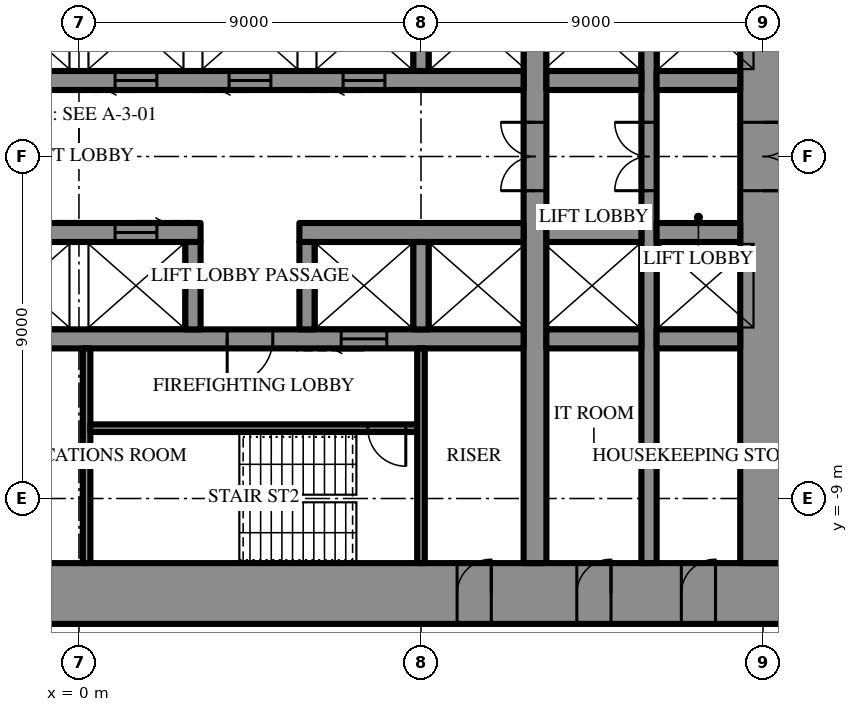
"""IFC4 building model, lengths in metres.
Left out: names, types, materials, properties, quantities, classifications, styles, units other than length and angle.
Written with IfcOpenShell. Run it as: python <this file> out.ifc"""

import sys

from ifc_helpers import new_model, si_unit, direction, frame, frame_2d, origin, place, context, subcontext, project, spatial, rectangle, extrude, element, fill, save


model = new_model("IFC4")
c1 = context("Model", 3, precision=1e-05, world=origin(), true_north=direction((0.0, 1.0)))
c2 = subcontext(c1, "Body", "Model", "MODEL_VIEW")
j1 = project(units=[si_unit("LENGTHUNIT", "METRE"), si_unit("PLANEANGLEUNIT", "RADIAN")], contexts=[c1])
p1 = place(None, origin())
s1 = spatial("IfcSite", under=j1, at=p1, CompositionType="ELEMENT")
p2 = place(p1, origin())
s2 = spatial("IfcBuilding", under=s1, at=p2, CompositionType="ELEMENT")
p3 = place(p2, frame((0.0, 0.0, 73.9)))
s3 = spatial("IfcBuildingStorey", under=s2, at=p3, CompositionType="ELEMENT", Elevation=73.9)
p4 = place(p3, frame((18.6, -11.5, 0.0), z_axis=(0.0, 0.0, 1.0), x_axis=(-1.0, 0.0, 0.0)))
e1 = element("IfcWall", 1, at=p4, inside=s3, PredefinedType="SHEAR", context=c2, shape_type="SweptSolid", body=[
    extrude(rectangle(XDim=37.2, YDim=1.6, at=frame_2d((18.6, 0.0))), origin(), (0.0, 0.0, 1.0), 4.2),
])
p5 = place(p4, frame((19.45, 0.0, 0.0)))
e2 = element("IfcOpeningElement", 2, at=p5, cuts=e1, PredefinedType="OPENING", context=c2, shape_type="SweptSolid", body=[
    extrude(rectangle(XDim=0.9, YDim=2.2, at=frame_2d((0.45, 1.1))), frame((0.0, 0.81, 0.0), z_axis=(0.0, -1.0, 0.0), x_axis=(1.0, 0.0, 0.0)), (0.0, 0.0, 1.0), 1.62),
])
p6 = place(p4, frame((22.45, 0.0, 0.0)))
e3 = element("IfcOpeningElement", 3, at=p6, cuts=e1, PredefinedType="OPENING", context=c2, shape_type="SweptSolid", body=[
    extrude(rectangle(XDim=0.9, YDim=2.2, at=frame_2d((0.45, 1.1))), frame((0.0, 0.81, 0.0), z_axis=(0.0, -1.0, 0.0), x_axis=(1.0, 0.0, 0.0)), (0.0, 0.0, 1.0), 1.62),
])
p7 = place(p4, frame((25.5, 0.0, 0.0)))
e4 = element("IfcOpeningElement", 4, at=p7, cuts=e1, PredefinedType="OPENING", context=c2, shape_type="SweptSolid", body=[
    extrude(rectangle(XDim=1.0, YDim=2.2, at=frame_2d((0.5, 1.1))), frame((0.0, 0.81, 0.0), z_axis=(0.0, -1.0, 0.0), x_axis=(1.0, 0.0, 0.0)), (0.0, 0.0, 1.0), 1.62),
])
p8 = place(p4, frame((1.85, 0.0, 0.0)))
e5 = element("IfcOpeningElement", 5, at=p8, cuts=e1, PredefinedType="OPENING", context=c2, shape_type="SweptSolid", body=[
    extrude(rectangle(XDim=0.9, YDim=2.2, at=frame_2d((0.45, 1.1))), frame((0.0, 0.81, 0.0), z_axis=(0.0, -1.0, 0.0), x_axis=(1.0, 0.0, 0.0)), (0.0, 0.0, 1.0), 1.62),
])
p9 = place(p4, frame((4.6, 0.0, 0.0)))
e6 = element("IfcOpeningElement", 6, at=p9, cuts=e1, PredefinedType="OPENING", context=c2, shape_type="SweptSolid", body=[
    extrude(rectangle(XDim=0.9, YDim=2.2, at=frame_2d((0.45, 1.1))), frame((0.0, 0.81, 0.0), z_axis=(0.0, -1.0, 0.0), x_axis=(1.0, 0.0, 0.0)), (0.0, 0.0, 1.0), 1.62),
])
p10 = place(p4, frame((7.75, 0.0, 0.0)))
e7 = element("IfcOpeningElement", 7, at=p10, cuts=e1, PredefinedType="OPENING", context=c2, shape_type="SweptSolid", body=[
    extrude(rectangle(XDim=0.9, YDim=2.2, at=frame_2d((0.45, 1.1))), frame((0.0, 0.81, 0.0), z_axis=(0.0, -1.0, 0.0), x_axis=(1.0, 0.0, 0.0)), (0.0, 0.0, 1.0), 1.62),
])
p11 = place(p4, frame((28.55, 0.0, 0.0)))
e8 = element("IfcOpeningElement", 8, at=p11, cuts=e1, PredefinedType="OPENING", context=c2, shape_type="SweptSolid", body=[
    extrude(rectangle(XDim=0.9, YDim=2.2, at=frame_2d((0.45, 1.1))), frame((0.0, 0.81, 0.0), z_axis=(0.0, -1.0, 0.0), x_axis=(1.0, 0.0, 0.0)), (0.0, 0.0, 1.0), 1.62),
])
p12 = place(p4, frame((31.7, 0.0, 0.0)))
e9 = element("IfcOpeningElement", 9, at=p12, cuts=e1, PredefinedType="OPENING", context=c2, shape_type="SweptSolid", body=[
    extrude(rectangle(XDim=0.9, YDim=2.2, at=frame_2d((0.45, 1.1))), frame((0.0, 0.81, 0.0), z_axis=(0.0, -1.0, 0.0), x_axis=(1.0, 0.0, 0.0)), (0.0, 0.0, 1.0), 1.62),
])
p13 = place(p4, frame((34.45, 0.0, 0.0)))
e10 = element("IfcOpeningElement", 10, at=p13, cuts=e1, PredefinedType="OPENING", context=c2, shape_type="SweptSolid", body=[
    extrude(rectangle(XDim=0.9, YDim=2.2, at=frame_2d((0.45, 1.1))), frame((0.0, 0.81, 0.0), z_axis=(0.0, -1.0, 0.0), x_axis=(1.0, 0.0, 0.0)), (0.0, 0.0, 1.0), 1.62),
])
p14 = place(p3, frame((18.0, -10.7, 0.0), z_axis=(0.0, 0.0, 1.0), x_axis=(0.0, 1.0, 0.0)))
e11 = element("IfcWall", 11, at=p14, inside=s3, PredefinedType="SHEAR", context=c2, shape_type="SweptSolid", body=[
    extrude(rectangle(XDim=21.4, YDim=1.2, at=frame_2d((10.7, 0.0))), origin(), (0.0, 0.0, 1.0), 4.2),
])
p15 = place(p14, frame((9.8, 0.0, 0.0)))
e12 = element("IfcOpeningElement", 12, at=p15, cuts=e11, PredefinedType="OPENING", context=c2, shape_type="SweptSolid", body=[
    extrude(rectangle(XDim=1.8, YDim=2.4, at=frame_2d((0.9, 1.2))), frame((0.0, 0.61, 0.0), z_axis=(0.0, -1.0, 0.0), x_axis=(1.0, 0.0, 0.0)), (0.0, 0.0, 1.0), 1.22),
])
p16 = place(p3, frame((12.0, -10.7, 0.0), z_axis=(0.0, 0.0, 1.0), x_axis=(0.0, 1.0, 0.0)))
e13 = element("IfcWall", 13, at=p16, inside=s3, PredefinedType="SHEAR", context=c2, shape_type="SweptSolid", body=[
    extrude(rectangle(XDim=21.4, YDim=0.6, at=frame_2d((10.7, 0.0))), origin(), (0.0, 0.0, 1.0), 4.2),
])
p17 = place(p16, frame((9.8, 0.0, 0.0)))
e14 = element("IfcOpeningElement", 14, at=p17, cuts=e13, PredefinedType="OPENING", context=c2, shape_type="SweptSolid", body=[
    extrude(rectangle(XDim=1.8, YDim=2.4, at=frame_2d((0.9, 1.2))), frame((0.0, 0.31, 0.0), z_axis=(0.0, -1.0, 0.0), x_axis=(1.0, 0.0, 0.0)), (0.0, 0.0, 1.0), 0.62),
])
p18 = place(p3, frame((15.0, -10.7, 0.0), z_axis=(0.0, 0.0, 1.0), x_axis=(0.0, 1.0, 0.0)))
e15 = element("IfcWall", 15, at=p18, inside=s3, PredefinedType="SHEAR", context=c2, shape_type="SweptSolid", body=[
    extrude(rectangle(XDim=21.4, YDim=0.4, at=frame_2d((10.7, 0.0))), origin(), (0.0, 0.0, 1.0), 4.2),
])
p19 = place(p18, frame((9.8, 0.0, 0.0)))
e16 = element("IfcOpeningElement", 16, at=p19, cuts=e15, PredefinedType="OPENING", context=c2, shape_type="SweptSolid", body=[
    extrude(rectangle(XDim=1.8, YDim=2.4, at=frame_2d((0.9, 1.2))), frame((0.0, 0.21, 0.0), z_axis=(0.0, -1.0, 0.0), x_axis=(1.0, 0.0, 0.0)), (0.0, 0.0, 1.0), 0.42),
])
p20 = place(p3, frame((-3.2, 2.0, 0.0), z_axis=(0.0, 0.0, 1.0), x_axis=(1.0, 0.0, 0.0)))
e17 = element("IfcWall", 17, at=p20, inside=s3, PredefinedType="SHEAR", context=c2, shape_type="SweptSolid", body=[
    extrude(rectangle(XDim=14.9, YDim=0.5, at=frame_2d((7.45, 0.0))), origin(), (0.0, 0.0, 1.0), 4.2),
])
p21 = place(p20, frame((1.15, 0.0, 0.0)))
e18 = element("IfcOpeningElement", 18, at=p21, cuts=e17, PredefinedType="OPENING", context=c2, shape_type="SweptSolid", body=[
    extrude(rectangle(XDim=1.1, YDim=2.2, at=frame_2d((0.55, 1.1))), frame((0.0, 0.26, 0.0), z_axis=(0.0, -1.0, 0.0), x_axis=(1.0, 0.0, 0.0)), (0.0, 0.0, 1.0), 0.52),
])
p22 = place(p20, frame((4.15, 0.0, 0.0)))
e19 = element("IfcOpeningElement", 19, at=p22, cuts=e17, PredefinedType="OPENING", context=c2, shape_type="SweptSolid", body=[
    extrude(rectangle(XDim=1.1, YDim=2.2, at=frame_2d((0.55, 1.1))), frame((0.0, 0.26, 0.0), z_axis=(0.0, -1.0, 0.0), x_axis=(1.0, 0.0, 0.0)), (0.0, 0.0, 1.0), 0.52),
])
p23 = place(p20, frame((7.15, 0.0, 0.0)))
e20 = element("IfcOpeningElement", 20, at=p23, cuts=e17, PredefinedType="OPENING", context=c2, shape_type="SweptSolid", body=[
    extrude(rectangle(XDim=1.1, YDim=2.2, at=frame_2d((0.55, 1.1))), frame((0.0, 0.26, 0.0), z_axis=(0.0, -1.0, 0.0), x_axis=(1.0, 0.0, 0.0)), (0.0, 0.0, 1.0), 0.52),
])
p24 = place(p20, frame((10.15, 0.0, 0.0)))
e21 = element("IfcOpeningElement", 21, at=p24, cuts=e17, PredefinedType="OPENING", context=c2, shape_type="SweptSolid", body=[
    extrude(rectangle(XDim=1.1, YDim=2.2, at=frame_2d((0.55, 1.1))), frame((0.0, 0.26, 0.0), z_axis=(0.0, -1.0, 0.0), x_axis=(1.0, 0.0, 0.0)), (0.0, 0.0, 1.0), 0.52),
])
p25 = place(p3, frame((12.3, 2.0, 0.0), z_axis=(0.0, 0.0, 1.0), x_axis=(1.0, 0.0, 0.0)))
e22 = element("IfcWall", 22, at=p25, inside=s3, PredefinedType="SHEAR", context=c2, shape_type="SweptSolid", body=[
    extrude(rectangle(XDim=2.5, YDim=0.5, at=frame_2d((1.25, 0.0))), origin(), (0.0, 0.0, 1.0), 4.2),
])
p26 = place(p3, frame((15.2, 2.0, 0.0), z_axis=(0.0, 0.0, 1.0), x_axis=(1.0, 0.0, 0.0)))
e23 = element("IfcWall", 23, at=p26, inside=s3, PredefinedType="SHEAR", context=c2, shape_type="SweptSolid", body=[
    extrude(rectangle(XDim=2.2, YDim=0.5, at=frame_2d((1.1, 0.0))), origin(), (0.0, 0.0, 1.0), 4.2),
])
p27 = place(p3, frame((9.0, 2.25, 0.0), z_axis=(0.0, 0.0, 1.0), x_axis=(0.0, 1.0, 0.0)))
e24 = element("IfcWall", 24, at=p27, inside=s3, PredefinedType="SHEAR", context=c2, shape_type="SweptSolid", body=[
    extrude(rectangle(XDim=2.3, YDim=0.4, at=frame_2d((1.15, 0.0))), origin(), (0.0, 0.0, 1.0), 4.2),
])
p28 = place(p3, frame((17.4, -2.0, 0.0), z_axis=(0.0, 0.0, 1.0), x_axis=(-1.0, 0.0, 0.0)))
e25 = element("IfcWall", 25, at=p28, inside=s3, PredefinedType="SHEAR", context=c2, shape_type="SweptSolid", body=[
    extrude(rectangle(XDim=2.2, YDim=0.5, at=frame_2d((1.1, 0.0))), origin(), (0.0, 0.0, 1.0), 4.2),
])
p29 = place(p3, frame((14.8, -2.0, 0.0), z_axis=(0.0, 0.0, 1.0), x_axis=(-1.0, 0.0, 0.0)))
e26 = element("IfcWall", 26, at=p29, inside=s3, PredefinedType="SHEAR", context=c2, shape_type="SweptSolid", body=[
    extrude(rectangle(XDim=2.5, YDim=0.5, at=frame_2d((1.25, 0.0))), origin(), (0.0, 0.0, 1.0), 4.2),
])
p30 = place(p3, frame((11.7, -2.0, 0.0), z_axis=(0.0, 0.0, 1.0), x_axis=(-1.0, 0.0, 0.0)))
e27 = element("IfcWall", 27, at=p30, inside=s3, PredefinedType="SHEAR", context=c2, shape_type="SweptSolid", body=[
    extrude(rectangle(XDim=5.9, YDim=0.5, at=frame_2d((2.95, 0.0))), origin(), (0.0, 0.0, 1.0), 4.2),
])
p31 = place(p3, frame((3.2, -2.0, 0.0), z_axis=(0.0, 0.0, 1.0), x_axis=(-1.0, 0.0, 0.0)))
e28 = element("IfcWall", 28, at=p31, inside=s3, PredefinedType="SHEAR", context=c2, shape_type="SweptSolid", body=[
    extrude(rectangle(XDim=14.9, YDim=0.5, at=frame_2d((7.45, 0.0))), origin(), (0.0, 0.0, 1.0), 4.2),
])
p32 = place(p31, frame((1.15, 0.0, 0.0)))
e29 = element("IfcOpeningElement", 29, at=p32, cuts=e28, PredefinedType="OPENING", context=c2, shape_type="SweptSolid", body=[
    extrude(rectangle(XDim=1.1, YDim=2.2, at=frame_2d((0.55, 1.1))), frame((0.0, 0.26, 0.0), z_axis=(0.0, -1.0, 0.0), x_axis=(1.0, 0.0, 0.0)), (0.0, 0.0, 1.0), 0.52),
])
p33 = place(p31, frame((4.15, 0.0, 0.0)))
e30 = element("IfcOpeningElement", 30, at=p33, cuts=e28, PredefinedType="OPENING", context=c2, shape_type="SweptSolid", body=[
    extrude(rectangle(XDim=1.1, YDim=2.2, at=frame_2d((0.55, 1.1))), frame((0.0, 0.26, 0.0), z_axis=(0.0, -1.0, 0.0), x_axis=(1.0, 0.0, 0.0)), (0.0, 0.0, 1.0), 0.52),
])
p34 = place(p31, frame((7.15, 0.0, 0.0)))
e31 = element("IfcOpeningElement", 31, at=p34, cuts=e28, PredefinedType="OPENING", context=c2, shape_type="SweptSolid", body=[
    extrude(rectangle(XDim=1.1, YDim=2.2, at=frame_2d((0.55, 1.1))), frame((0.0, 0.26, 0.0), z_axis=(0.0, -1.0, 0.0), x_axis=(1.0, 0.0, 0.0)), (0.0, 0.0, 1.0), 0.52),
])
p35 = place(p31, frame((10.15, 0.0, 0.0)))
e32 = element("IfcOpeningElement", 32, at=p35, cuts=e28, PredefinedType="OPENING", context=c2, shape_type="SweptSolid", body=[
    extrude(rectangle(XDim=1.1, YDim=2.2, at=frame_2d((0.55, 1.1))), frame((0.0, 0.26, 0.0), z_axis=(0.0, -1.0, 0.0), x_axis=(1.0, 0.0, 0.0)), (0.0, 0.0, 1.0), 0.52),
])
p36 = place(p3, frame((17.4, -4.8, 0.0), z_axis=(0.0, 0.0, 1.0), x_axis=(-1.0, 0.0, 0.0)))
e33 = element("IfcWall", 33, at=p36, inside=s3, PredefinedType="SHEAR", context=c2, shape_type="SweptSolid", body=[
    extrude(rectangle(XDim=2.2, YDim=0.5, at=frame_2d((1.1, 0.0))), origin(), (0.0, 0.0, 1.0), 4.2),
])
p37 = place(p3, frame((14.8, -4.8, 0.0), z_axis=(0.0, 0.0, 1.0), x_axis=(-1.0, 0.0, 0.0)))
e34 = element("IfcWall", 34, at=p37, inside=s3, PredefinedType="SHEAR", context=c2, shape_type="SweptSolid", body=[
    extrude(rectangle(XDim=2.5, YDim=0.5, at=frame_2d((1.25, 0.0))), origin(), (0.0, 0.0, 1.0), 4.2),
])
p38 = place(p3, frame((11.7, -4.8, 0.0), z_axis=(0.0, 0.0, 1.0), x_axis=(-1.0, 0.0, 0.0)))
e35 = element("IfcWall", 35, at=p38, inside=s3, PredefinedType="SHEAR", context=c2, shape_type="SweptSolid", body=[
    extrude(rectangle(XDim=23.4, YDim=0.5, at=frame_2d((11.7, 0.0))), origin(), (0.0, 0.0, 1.0), 4.2),
])
p39 = place(p38, frame((6.6, 0.0, 0.0)))
e36 = element("IfcOpeningElement", 36, at=p39, cuts=e35, PredefinedType="OPENING", context=c2, shape_type="SweptSolid", body=[
    extrude(rectangle(XDim=1.2, YDim=2.2, at=frame_2d((0.6, 1.1))), frame((0.0, 0.26, 0.0), z_axis=(0.0, -1.0, 0.0), x_axis=(1.0, 0.0, 0.0)), (0.0, 0.0, 1.0), 0.52),
])
p40 = place(p38, frame((3.6, 0.0, 0.0)))
e37 = element("IfcOpeningElement", 37, at=p40, cuts=e35, PredefinedType="OPENING", context=c2, shape_type="SweptSolid", body=[
    extrude(rectangle(XDim=1.2, YDim=2.2, at=frame_2d((0.6, 1.1))), frame((0.0, 0.26, 0.0), z_axis=(0.0, -1.0, 0.0), x_axis=(1.0, 0.0, 0.0)), (0.0, 0.0, 1.0), 0.52),
])
for number, where, z_axis, x_axis in (
    (38, (9.0, -2.25, 0.0), (0.0, 0.0, 1.0), (0.0, -1.0, 0.0)),
    (39, (6.0, -2.25, 0.0), (0.0, 0.0, 1.0), (0.0, -1.0, 0.0)),
    (40, (3.0, -2.25, 0.0), (0.0, 0.0, 1.0), (0.0, -1.0, 0.0)),
):
    element("IfcWall", number, at=place(p3, frame(where, z_axis=z_axis, x_axis=x_axis)), inside=s3, PredefinedType="SHEAR", context=c2, shape_type="SweptSolid", body=[
        extrude(rectangle(XDim=2.3, YDim=0.4, at=frame_2d((1.15, 0.0))), origin(), (0.0, 0.0, 1.0), 4.2),
    ])
p41 = place(p3, frame((0.2, -5.05, 0.0), z_axis=(0.0, 0.0, 1.0), x_axis=(0.0, -1.0, 0.0)))
e41 = element("IfcWall", 41, at=p41, inside=s3, PredefinedType="SHEAR", context=c2, shape_type="SweptSolid", body=[
    extrude(rectangle(XDim=5.65, YDim=0.2, at=frame_2d((2.825, 0.0))), origin(), (0.0, 0.0, 1.0), 4.2),
])
p42 = place(p3, frame((8.9, -7.15, 0.0), z_axis=(0.0, 0.0, 1.0), x_axis=(-1.0, 0.0, 0.0)))
e42 = element("IfcWall", 42, at=p42, inside=s3, PredefinedType="SHEAR", context=c2, shape_type="SweptSolid", body=[
    extrude(rectangle(XDim=8.6, YDim=0.2, at=frame_2d((4.3, 0.0))), origin(), (0.0, 0.0, 1.0), 4.2),
])
p43 = place(p42, frame((0.3, 0.0, 0.0)))
e43 = element("IfcOpeningElement", 43, at=p43, cuts=e42, PredefinedType="OPENING", context=c2, shape_type="SweptSolid", body=[
    extrude(rectangle(XDim=1.0, YDim=2.2, at=frame_2d((0.5, 1.1))), frame((0.0, 0.11, 0.0), z_axis=(0.0, -1.0, 0.0), x_axis=(1.0, 0.0, 0.0)), (0.0, 0.0, 1.0), 0.22),
])
p44 = place(p3, frame((9.0, -5.05, 0.0), z_axis=(0.0, 0.0, 1.0), x_axis=(0.0, -1.0, 0.0)))
e44 = element("IfcWall", 44, at=p44, inside=s3, PredefinedType="PARTITIONING", context=c2, shape_type="SweptSolid", body=[
    extrude(rectangle(XDim=5.65, YDim=0.2, at=frame_2d((2.825, 0.0))), origin(), (0.0, 0.0, 1.0), 4.0),
])
p45 = place(p15, frame((1.8, 0.0, 0.0), z_axis=(0.0, 0.0, 1.0), x_axis=(-1.0, 0.0, 0.0)))
e45 = element("IfcDoor", 45, at=p45, inside=s3, OperationType="DOUBLE_DOOR_SINGLE_SWING", PredefinedType="DOOR", context=c2, shape_type="SweptSolid", body=[
    extrude(rectangle(XDim=1.8, YDim=2.4, at=frame_2d((0.9, 1.2))), frame((0.0, 0.025, 0.0), z_axis=(0.0, -1.0, 0.0), x_axis=(1.0, 0.0, 0.0)), (0.0, 0.0, 1.0), 0.05),
])
fill(e12, e45)
p46 = place(p39, origin())
e46 = element("IfcDoor", 46, at=p46, inside=s3, OperationType="SINGLE_SWING_LEFT", PredefinedType="DOOR", context=c2, shape_type="SweptSolid", body=[
    extrude(rectangle(XDim=1.2, YDim=2.2, at=frame_2d((0.6, 1.1))), frame((0.0, 0.025, 0.0), z_axis=(0.0, -1.0, 0.0), x_axis=(1.0, 0.0, 0.0)), (0.0, 0.0, 1.0), 0.05),
])
fill(e36, e46)
p47 = place(p43, origin())
e47 = element("IfcDoor", 47, at=p47, inside=s3, OperationType="SINGLE_SWING_RIGHT", PredefinedType="DOOR", context=c2, shape_type="SweptSolid", body=[
    extrude(rectangle(XDim=1.0, YDim=2.2, at=frame_2d((0.5, 1.1))), frame((0.0, 0.025, 0.0), z_axis=(0.0, -1.0, 0.0), x_axis=(1.0, 0.0, 0.0)), (0.0, 0.0, 1.0), 0.05),
])
fill(e43, e47)
p48 = place(p8, frame((0.9, 0.0, 0.0), z_axis=(0.0, 0.0, 1.0), x_axis=(-1.0, 0.0, 0.0)))
e48 = element("IfcDoor", 48, at=p48, inside=s3, OperationType="SINGLE_SWING_LEFT", PredefinedType="DOOR", context=c2, shape_type="SweptSolid", body=[
    extrude(rectangle(XDim=0.9, YDim=2.2, at=frame_2d((0.45, 1.1))), frame((0.0, 0.025, 0.0), z_axis=(0.0, -1.0, 0.0), x_axis=(1.0, 0.0, 0.0)), (0.0, 0.0, 1.0), 0.05),
])
fill(e5, e48)
p49 = place(p9, frame((0.9, 0.0, 0.0), z_axis=(0.0, 0.0, 1.0), x_axis=(-1.0, 0.0, 0.0)))
e49 = element("IfcDoor", 49, at=p49, inside=s3, OperationType="SINGLE_SWING_LEFT", PredefinedType="DOOR", context=c2, shape_type="SweptSolid", body=[
    extrude(rectangle(XDim=0.9, YDim=2.2, at=frame_2d((0.45, 1.1))), frame((0.0, 0.025, 0.0), z_axis=(0.0, -1.0, 0.0), x_axis=(1.0, 0.0, 0.0)), (0.0, 0.0, 1.0), 0.05),
])
fill(e6, e49)
p50 = place(p10, frame((0.9, 0.0, 0.0), z_axis=(0.0, 0.0, 1.0), x_axis=(-1.0, 0.0, 0.0)))
e50 = element("IfcDoor", 50, at=p50, inside=s3, OperationType="SINGLE_SWING_LEFT", PredefinedType="DOOR", context=c2, shape_type="SweptSolid", body=[
    extrude(rectangle(XDim=0.9, YDim=2.2, at=frame_2d((0.45, 1.1))), frame((0.0, 0.025, 0.0), z_axis=(0.0, -1.0, 0.0), x_axis=(1.0, 0.0, 0.0)), (0.0, 0.0, 1.0), 0.05),
])
fill(e7, e50)
p51 = place(p17, origin())
e51 = element("IfcDoor", 51, at=p51, inside=s3, OperationType="DOUBLE_DOOR_SINGLE_SWING", PredefinedType="DOOR", context=c2, shape_type="SweptSolid", body=[
    extrude(rectangle(XDim=1.8, YDim=2.4, at=frame_2d((0.9, 1.2))), frame((0.0, 0.025, 0.0), z_axis=(0.0, -1.0, 0.0), x_axis=(1.0, 0.0, 0.0)), (0.0, 0.0, 1.0), 0.05),
])
fill(e14, e51)
p52 = place(p19, origin())
e52 = element("IfcDoor", 52, at=p52, inside=s3, OperationType="DOUBLE_DOOR_SINGLE_SWING", PredefinedType="DOOR", context=c2, shape_type="SweptSolid", body=[
    extrude(rectangle(XDim=1.8, YDim=2.4, at=frame_2d((0.9, 1.2))), frame((0.0, 0.025, 0.0), z_axis=(0.0, -1.0, 0.0), x_axis=(1.0, 0.0, 0.0)), (0.0, 0.0, 1.0), 0.05),
])
fill(e16, e52)
p53 = place(p22, frame((1.1, 0.0, 0.0), z_axis=(0.0, 0.0, 1.0), x_axis=(-1.0, 0.0, 0.0)))
e53 = element("IfcDoor", 53, at=p53, inside=s3, OperationType="SLIDING_TO_LEFT", PredefinedType="DOOR", context=c2, shape_type="SweptSolid", body=[
    extrude(rectangle(XDim=1.1, YDim=2.2, at=frame_2d((0.55, 1.1))), frame((0.0, 0.025, 0.0), z_axis=(0.0, -1.0, 0.0), x_axis=(1.0, 0.0, 0.0)), (0.0, 0.0, 1.0), 0.05),
])
fill(e19, e53)
p54 = place(p23, frame((1.1, 0.0, 0.0), z_axis=(0.0, 0.0, 1.0), x_axis=(-1.0, 0.0, 0.0)))
e54 = element("IfcDoor", 54, at=p54, inside=s3, OperationType="SLIDING_TO_LEFT", PredefinedType="DOOR", context=c2, shape_type="SweptSolid", body=[
    extrude(rectangle(XDim=1.1, YDim=2.2, at=frame_2d((0.55, 1.1))), frame((0.0, 0.025, 0.0), z_axis=(0.0, -1.0, 0.0), x_axis=(1.0, 0.0, 0.0)), (0.0, 0.0, 1.0), 0.05),
])
fill(e20, e54)
p55 = place(p24, frame((1.1, 0.0, 0.0), z_axis=(0.0, 0.0, 1.0), x_axis=(-1.0, 0.0, 0.0)))
e55 = element("IfcDoor", 55, at=p55, inside=s3, OperationType="SLIDING_TO_LEFT", PredefinedType="DOOR", context=c2, shape_type="SweptSolid", body=[
    extrude(rectangle(XDim=1.1, YDim=2.2, at=frame_2d((0.55, 1.1))), frame((0.0, 0.025, 0.0), z_axis=(0.0, -1.0, 0.0), x_axis=(1.0, 0.0, 0.0)), (0.0, 0.0, 1.0), 0.05),
])
fill(e21, e55)
p56 = place(p40, origin())
e56 = element("IfcDoor", 56, at=p56, inside=s3, OperationType="SLIDING_TO_LEFT", PredefinedType="DOOR", context=c2, shape_type="SweptSolid", body=[
    extrude(rectangle(XDim=1.2, YDim=2.2, at=frame_2d((0.6, 1.1))), frame((0.0, 0.025, 0.0), z_axis=(0.0, -1.0, 0.0), x_axis=(1.0, 0.0, 0.0)), (0.0, 0.0, 1.0), 0.05),
])
fill(e37, e56)
p57 = place(p32, frame((1.1, 0.0, 0.0), z_axis=(0.0, 0.0, 1.0), x_axis=(-1.0, 0.0, 0.0)))
e57 = element("IfcDoor", 57, at=p57, inside=s3, OperationType="SLIDING_TO_LEFT", PredefinedType="DOOR", context=c2, shape_type="SweptSolid", body=[
    extrude(rectangle(XDim=1.1, YDim=2.2, at=frame_2d((0.55, 1.1))), frame((0.0, 0.025, 0.0), z_axis=(0.0, -1.0, 0.0), x_axis=(1.0, 0.0, 0.0)), (0.0, 0.0, 1.0), 0.05),
])
fill(e29, e57)
save(model, sys.argv[1])
